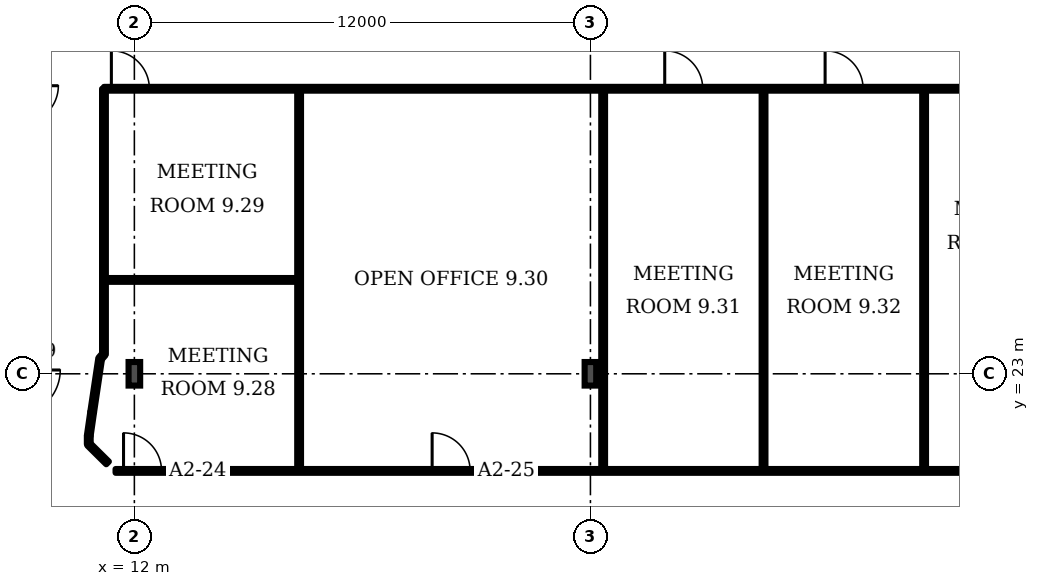
"""IFC4 building model, lengths in metres.
Left out: names, types, materials, properties, quantities, classifications, styles, units other than length and angle.
Written with IfcOpenShell. Run it as: python <this file> out.ifc"""

import sys

from ifc_helpers import new_model, si_unit, direction, frame, frame_2d, origin, origin_2d, place, context, subcontext, project, spatial, rectangle, i_section, extrude, element, fill, save


model = new_model("IFC4")
c1 = context("Model", 3, precision=1e-05, world=origin(), true_north=direction((0.0, 1.0)))
c2 = subcontext(c1, "Body", "Model", "MODEL_VIEW")
j1 = project(units=[si_unit("LENGTHUNIT", "METRE"), si_unit("PLANEANGLEUNIT", "RADIAN")], contexts=[c1])
p1 = place(None, origin())
s1 = spatial("IfcSite", under=j1, at=p1, CompositionType="ELEMENT")
p2 = place(p1, origin())
s2 = spatial("IfcBuilding", under=s1, at=p2, CompositionType="ELEMENT")
p3 = place(p2, frame((0.0, 0.0, 52.3)))
s3 = spatial("IfcBuildingStorey", under=s2, at=p3, CompositionType="ELEMENT", Elevation=52.3)
for number, where, z_axis, x_axis in (
    (1, (12.0, 23.0, 0.0), (0.0, 0.0, 1.0), (1.0, 0.0, 0.0)),
    (2, (24.0, 23.0, 0.0), (0.0, 0.0, 1.0), (1.0, 0.0, 0.0)),
):
    element("IfcColumn", number, at=place(p3, frame(where, z_axis=z_axis, x_axis=x_axis)), inside=s3, PredefinedType="COLUMN", context=c2, shape_type="SweptSolid", body=[
        extrude(i_section(OverallWidth=0.305, OverallDepth=0.62, WebThickness=0.021, FlangeThickness=0.04, FilletRadius=0.027, at=origin_2d()), origin(), (0.0, 0.0, 1.0), 3.6),
    ])
p4 = place(p3, frame((10.8, 21.145, 0.0), z_axis=(0.0, 0.0, 1.0), x_axis=(0.0, 1.0, 0.0)))
e3 = element("IfcWall", 3, at=p4, inside=s3, PredefinedType="PARTITIONING", context=c2, shape_type="SweptSolid", body=[
    extrude(rectangle(XDim=0.225, YDim=0.1, at=frame_2d((0.113, 0.0))), origin(), (0.0, 0.0, 1.0), 3.2),
])
p5 = place(p3, frame((10.8, 21.37, 0.0), z_axis=(0.0, 0.0, 1.0), x_axis=(0.142287, 0.989823, 0.0)))
e4 = element("IfcWall", 4, at=p5, inside=s3, PredefinedType="PARTITIONING", context=c2, shape_type="SweptSolid", body=[
    extrude(rectangle(XDim=0.631, YDim=0.1, at=frame_2d((0.316, 0.0))), origin(), (0.0, 0.0, 1.0), 3.2),
])
p6 = place(p3, frame((10.89, 21.995, 0.0), z_axis=(0.0, 0.0, 1.0), x_axis=(0.147988, 0.988993, 0.0)))
e5 = element("IfcWall", 5, at=p6, inside=s3, PredefinedType="PARTITIONING", context=c2, shape_type="SweptSolid", body=[
    extrude(rectangle(XDim=1.42, YDim=0.1, at=frame_2d((0.71, 0.0))), origin(), (0.0, 0.0, 1.0), 3.2),
])
p7 = place(p3, frame((11.1, 23.4, 0.0), z_axis=(0.0, 0.0, 1.0), x_axis=(0.65566, 0.755051, 0.0)))
e6 = element("IfcWall", 6, at=p7, inside=s3, PredefinedType="PARTITIONING", context=c2, shape_type="SweptSolid", body=[
    extrude(rectangle(XDim=0.152, YDim=0.1, at=frame_2d((0.076, 0.0))), origin(), (0.0, 0.0, 1.0), 3.2),
])
p8 = place(p3, frame((11.2, 23.515, 0.0), z_axis=(0.0, 0.0, 1.0), x_axis=(0.0, 1.0, 0.0)))
e7 = element("IfcWall", 7, at=p8, inside=s3, PredefinedType="PARTITIONING", context=c2, shape_type="SweptSolid", body=[
    extrude(rectangle(XDim=6.985, YDim=0.1, at=frame_2d((3.493, 0.0))), origin(), (0.0, 0.0, 1.0), 3.2),
])
p9 = place(p3, frame((11.2, 25.47, 0.0), z_axis=(0.0, 0.0, 1.0), x_axis=(1.0, 0.0, 0.0)))
e8 = element("IfcWall", 8, at=p9, inside=s3, PredefinedType="PARTITIONING", context=c2, shape_type="SweptSolid", body=[
    extrude(rectangle(XDim=5.135, YDim=0.1, at=frame_2d((2.567, 0.0))), origin(), (0.0, 0.0, 1.0), 3.2),
])
p10 = place(p3, frame((11.2, 30.5, 0.0), z_axis=(0.0, 0.0, 1.0), x_axis=(1.0, 0.0, 0.0)))
e9 = element("IfcWall", 9, at=p10, inside=s3, PredefinedType="PARTITIONING", context=c2, shape_type="SweptSolid", body=[
    extrude(rectangle(XDim=25.65, YDim=0.1, at=frame_2d((12.825, 0.0))), origin(), (0.0, 0.0, 1.0), 3.2),
])
p11 = place(p10, frame((0.195, 0.0, 0.0)))
e10 = element("IfcOpeningElement", 10, at=p11, cuts=e9, PredefinedType="OPENING", context=c2, shape_type="SweptSolid", body=[
    extrude(rectangle(XDim=1.0, YDim=2.1, at=frame_2d((0.5, 1.05))), frame((0.0, 0.06, 0.0), z_axis=(0.0, -1.0, 0.0), x_axis=(1.0, 0.0, 0.0)), (0.0, 0.0, 1.0), 0.12),
])
p12 = place(p10, frame((14.755, 0.0, 0.0)))
e11 = element("IfcOpeningElement", 11, at=p12, cuts=e9, PredefinedType="OPENING", context=c2, shape_type="SweptSolid", body=[
    extrude(rectangle(XDim=1.0, YDim=2.1, at=frame_2d((0.5, 1.05))), frame((0.0, 0.06, 0.0), z_axis=(0.0, -1.0, 0.0), x_axis=(1.0, 0.0, 0.0)), (0.0, 0.0, 1.0), 0.12),
])
p13 = place(p10, frame((18.975, 0.0, 0.0)))
e12 = element("IfcOpeningElement", 12, at=p13, cuts=e9, PredefinedType="OPENING", context=c2, shape_type="SweptSolid", body=[
    extrude(rectangle(XDim=1.0, YDim=2.1, at=frame_2d((0.5, 1.05))), frame((0.0, 0.06, 0.0), z_axis=(0.0, -1.0, 0.0), x_axis=(1.0, 0.0, 0.0)), (0.0, 0.0, 1.0), 0.12),
])
p14 = place(p3, frame((11.295, 20.655, 0.0), z_axis=(0.0, 0.0, 1.0), x_axis=(-0.7106, 0.703589, 0.0)))
e13 = element("IfcWall", 13, at=p14, inside=s3, PredefinedType="PARTITIONING", context=c2, shape_type="SweptSolid", body=[
    extrude(rectangle(XDim=0.697, YDim=0.1, at=frame_2d((0.348, 0.0))), origin(), (0.0, 0.0, 1.0), 3.2),
])
p15 = place(p3, frame((11.505, 20.445, 0.0), z_axis=(0.0, 0.0, 1.0), x_axis=(1.0, 0.0, 0.0)))
e14 = element("IfcWall", 14, at=p15, inside=s3, PredefinedType="PARTITIONING", context=c2, shape_type="SweptSolid", body=[
    extrude(rectangle(XDim=58.82, YDim=0.1, at=frame_2d((29.41, 0.0))), origin(), (0.0, 0.0, 1.0), 3.2),
])
p16 = place(p15, frame((0.21, 0.0, 0.0)))
e15 = element("IfcOpeningElement", 15, at=p16, cuts=e14, PredefinedType="OPENING", context=c2, shape_type="SweptSolid", body=[
    extrude(rectangle(XDim=1.0, YDim=2.1, at=frame_2d((0.5, 1.05))), frame((0.0, 0.06, 0.0), z_axis=(0.0, -1.0, 0.0), x_axis=(1.0, 0.0, 0.0)), (0.0, 0.0, 1.0), 0.12),
])
p17 = place(p15, frame((8.33, 0.0, 0.0)))
e16 = element("IfcOpeningElement", 16, at=p17, cuts=e14, PredefinedType="OPENING", context=c2, shape_type="SweptSolid", body=[
    extrude(rectangle(XDim=1.0, YDim=2.1, at=frame_2d((0.5, 1.05))), frame((0.0, 0.06, 0.0), z_axis=(0.0, -1.0, 0.0), x_axis=(1.0, 0.0, 0.0)), (0.0, 0.0, 1.0), 0.12),
])
p18 = place(p15, frame((22.795, 0.0, 0.0)))
e17 = element("IfcOpeningElement", 17, at=p18, cuts=e14, PredefinedType="OPENING", context=c2, shape_type="SweptSolid", body=[
    extrude(rectangle(XDim=1.0, YDim=2.1, at=frame_2d((0.5, 1.05))), frame((0.0, 0.06, 0.0), z_axis=(0.0, -1.0, 0.0), x_axis=(1.0, 0.0, 0.0)), (0.0, 0.0, 1.0), 0.12),
])
p19 = place(p15, frame((26.995, 0.0, 0.0)))
e18 = element("IfcOpeningElement", 18, at=p19, cuts=e14, PredefinedType="OPENING", context=c2, shape_type="SweptSolid", body=[
    extrude(rectangle(XDim=1.0, YDim=2.1, at=frame_2d((0.5, 1.05))), frame((0.0, 0.06, 0.0), z_axis=(0.0, -1.0, 0.0), x_axis=(1.0, 0.0, 0.0)), (0.0, 0.0, 1.0), 0.12),
])
p20 = place(p15, frame((30.995, 0.0, 0.0)))
e19 = element("IfcOpeningElement", 19, at=p20, cuts=e14, PredefinedType="OPENING", context=c2, shape_type="SweptSolid", body=[
    extrude(rectangle(XDim=1.0, YDim=2.1, at=frame_2d((0.5, 1.05))), frame((0.0, 0.06, 0.0), z_axis=(0.0, -1.0, 0.0), x_axis=(1.0, 0.0, 0.0)), (0.0, 0.0, 1.0), 0.12),
])
p21 = place(p15, frame((38.575, 0.0, 0.0)))
e20 = element("IfcOpeningElement", 20, at=p21, cuts=e14, PredefinedType="OPENING", context=c2, shape_type="SweptSolid", body=[
    extrude(rectangle(XDim=1.0, YDim=2.1, at=frame_2d((0.5, 1.05))), frame((0.0, 0.06, 0.0), z_axis=(0.0, -1.0, 0.0), x_axis=(1.0, 0.0, 0.0)), (0.0, 0.0, 1.0), 0.12),
])
p22 = place(p15, frame((54.12, 0.0, 0.0)))
e21 = element("IfcOpeningElement", 21, at=p22, cuts=e14, PredefinedType="OPENING", context=c2, shape_type="SweptSolid", body=[
    extrude(rectangle(XDim=1.8, YDim=2.1, at=frame_2d((0.9, 1.05))), frame((0.0, 0.06, 0.0), z_axis=(0.0, -1.0, 0.0), x_axis=(1.0, 0.0, 0.0)), (0.0, 0.0, 1.0), 0.12),
])
for number, where, z_axis, x_axis in (
    (22, (16.335, 20.445, 0.0), (0.0, 0.0, 1.0), (0.0, 1.0, 0.0)),
    (23, (24.335, 20.445, 0.0), (0.0, 0.0, 1.0), (0.0, 1.0, 0.0)),
    (24, (28.555, 20.445, 0.0), (0.0, 0.0, 1.0), (0.0, 1.0, 0.0)),
    (25, (32.78, 20.445, 0.0), (0.0, 0.0, 1.0), (0.0, 1.0, 0.0)),
):
    element("IfcWall", number, at=place(p3, frame(where, z_axis=z_axis, x_axis=x_axis)), inside=s3, PredefinedType="PARTITIONING", context=c2, shape_type="SweptSolid", body=[
        extrude(rectangle(XDim=10.055, YDim=0.1, at=frame_2d((5.027, 0.0))), origin(), (0.0, 0.0, 1.0), 3.2),
    ])
p23 = place(p16, origin())
e26 = element("IfcDoor", 26, at=p23, inside=s3, OperationType="SINGLE_SWING_LEFT", PredefinedType="DOOR", context=c2, shape_type="SweptSolid", body=[
    extrude(rectangle(XDim=1.0, YDim=2.1, at=frame_2d((0.5, 1.05))), frame((0.0, 0.025, 0.0), z_axis=(0.0, -1.0, 0.0), x_axis=(1.0, 0.0, 0.0)), (0.0, 0.0, 1.0), 0.05),
])
fill(e15, e26)
p24 = place(p17, origin())
e27 = element("IfcDoor", 27, at=p24, inside=s3, OperationType="SINGLE_SWING_LEFT", PredefinedType="DOOR", context=c2, shape_type="SweptSolid", body=[
    extrude(rectangle(XDim=1.0, YDim=2.1, at=frame_2d((0.5, 1.05))), frame((0.0, 0.025, 0.0), z_axis=(0.0, -1.0, 0.0), x_axis=(1.0, 0.0, 0.0)), (0.0, 0.0, 1.0), 0.05),
])
fill(e16, e27)
p25 = place(p11, origin())
e28 = element("IfcDoor", 28, at=p25, inside=s3, OperationType="SINGLE_SWING_LEFT", PredefinedType="DOOR", context=c2, shape_type="SweptSolid", body=[
    extrude(rectangle(XDim=1.0, YDim=2.1, at=frame_2d((0.5, 1.05))), frame((0.0, 0.025, 0.0), z_axis=(0.0, -1.0, 0.0), x_axis=(1.0, 0.0, 0.0)), (0.0, 0.0, 1.0), 0.05),
])
fill(e10, e28)
p26 = place(p12, origin())
e29 = element("IfcDoor", 29, at=p26, inside=s3, OperationType="SINGLE_SWING_LEFT", PredefinedType="DOOR", context=c2, shape_type="SweptSolid", body=[
    extrude(rectangle(XDim=1.0, YDim=2.1, at=frame_2d((0.5, 1.05))), frame((0.0, 0.025, 0.0), z_axis=(0.0, -1.0, 0.0), x_axis=(1.0, 0.0, 0.0)), (0.0, 0.0, 1.0), 0.05),
])
fill(e11, e29)
p27 = place(p13, origin())
e30 = element("IfcDoor", 30, at=p27, inside=s3, OperationType="SINGLE_SWING_LEFT", PredefinedType="DOOR", context=c2, shape_type="SweptSolid", body=[
    extrude(rectangle(XDim=1.0, YDim=2.1, at=frame_2d((0.5, 1.05))), frame((0.0, 0.025, 0.0), z_axis=(0.0, -1.0, 0.0), x_axis=(1.0, 0.0, 0.0)), (0.0, 0.0, 1.0), 0.05),
])
fill(e12, e30)
save(model, sys.argv[1])
